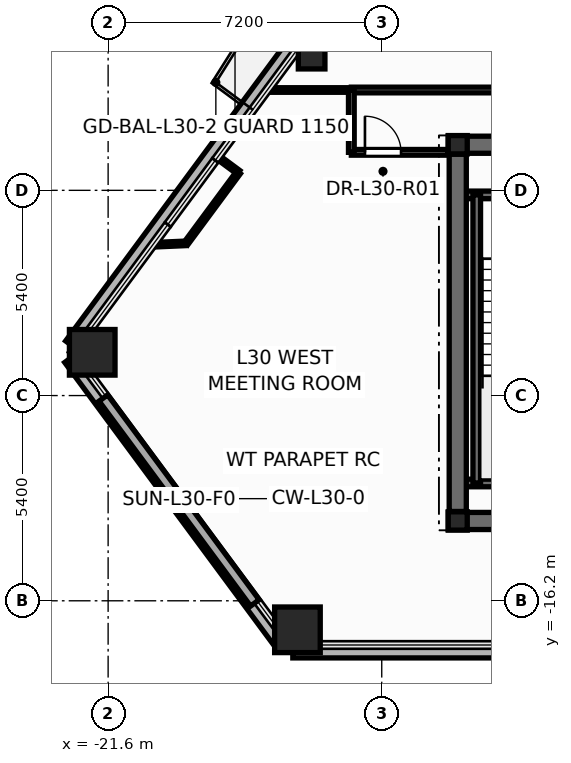
"""IFC4 building model, lengths in metres.
Left out: names, types, materials, properties, quantities, classifications, styles, units other than length and angle.
Written with IfcOpenShell. Run it as: python <this file> out.ifc"""

import sys

from ifc_helpers import new_model, si_unit, direction, frame, frame_2d, origin, origin_2d, place, context, subcontext, project, spatial, rectangle, hollow_rectangle, hollow_circle, i_section, extrude, element, fill, save


model = new_model("IFC4")
c1 = context("Model", 3, precision=1e-05, world=origin(), true_north=direction((0.0, 1.0)))
c2 = subcontext(c1, "Body", "Model", "MODEL_VIEW")
j1 = project(units=[si_unit("LENGTHUNIT", "METRE"), si_unit("PLANEANGLEUNIT", "RADIAN")], contexts=[c1])
p1 = place(None, origin())
s1 = spatial("IfcSite", under=j1, at=p1, CompositionType="ELEMENT")
p2 = place(p1, origin())
s2 = spatial("IfcBuilding", under=s1, at=p2, CompositionType="ELEMENT")
p3 = place(p2, frame((0.0, 0.0, 117.6)))
s3 = spatial("IfcBuildingStorey", under=s2, at=p3, CompositionType="ELEMENT", Elevation=117.6)
for number, where, z_axis, x_axis in (
    (1, (-22.019, -9.662, 0.0), (0.0, 0.0, 1.0), (1.0, 0.0, 0.0)),
    (2, (-16.618, -16.963, 0.0), (0.0, 0.0, 1.0), (1.0, 0.0, 0.0)),
):
    element("IfcColumn", number, at=place(p3, frame(where, z_axis=z_axis, x_axis=x_axis)), inside=s3, PredefinedType="COLUMN", context=c2, shape_type="SweptSolid", body=[
        extrude(hollow_rectangle(XDim=1.2, YDim=1.2, WallThickness=0.055, at=origin_2d()), origin(), (0.0, 0.0, 1.0), 4.5),
    ])
p4 = place(p3, frame((-16.245, -1.856, 0.0), z_axis=(0.0, 0.0, 1.0), x_axis=(1.0, 0.0, 0.0)))
e3 = element("IfcColumn", 3, at=p4, inside=s3, PredefinedType="COLUMN", context=c2, shape_type="SweptSolid", body=[
    extrude(hollow_circle(Radius=0.35, WallThickness=0.03, at=origin_2d()), origin(), (0.0, 0.0, 1.0), 4.5),
])
for number, where, z_axis, x_axis in (
    (4, (-12.4, -14.1, 0.0), (0.0, 0.0, 1.0), (1.0, 0.0, 0.0)),
    (5, (-12.4, -4.2, 0.0), (0.0, 0.0, 1.0), (1.0, 0.0, 0.0)),
):
    element("IfcColumn", number, at=place(p3, frame(where, z_axis=z_axis, x_axis=x_axis)), inside=s3, PredefinedType="COLUMN", context=c2, shape_type="SweptSolid", body=[
        extrude(i_section(OverallWidth=0.5, OverallDepth=0.482, WebThickness=0.04, FlangeThickness=0.045, at=origin_2d()), origin(), (0.0, 0.0, 1.0), 4.5),
    ])
p5 = place(p3, frame((-22.597, -9.821, -0.2), z_axis=(0.0, 0.0, 1.0), x_axis=(0.594653396723, -0.80398217503, 0.0)))
e6 = element("IfcWall", 6, at=p5, inside=s3, PredefinedType="PARAPET", context=c2, shape_type="SweptSolid", body=[
    extrude(rectangle(XDim=9.419, YDim=0.36, at=frame_2d((4.709, 0.0))), origin(), (0.0, 0.0, 1.0), 0.38),
])
p6 = place(p3, frame((-16.74, -17.523, -0.2), z_axis=(0.0, 0.0, 1.0), x_axis=(1.0, 0.0, 0.0)))
e7 = element("IfcWall", 7, at=p6, inside=s3, PredefinedType="PARAPET", context=c2, shape_type="SweptSolid", body=[
    extrude(rectangle(XDim=33.48, YDim=0.36, at=frame_2d((16.74, 0.0))), origin(), (0.0, 0.0, 1.0), 0.38),
])
p7 = place(p3, frame((-14.206, 1.843, -0.2), z_axis=(0.0, 0.0, 1.0), x_axis=(-0.594634463254, -0.803996178542, 0.0)))
e8 = element("IfcWall", 8, at=p7, inside=s3, PredefinedType="PARAPET", context=c2, shape_type="SweptSolid", body=[
    extrude(rectangle(XDim=14.072, YDim=0.36, at=frame_2d((7.036, 0.0))), origin(), (0.0, 0.0, 1.0), 0.38),
])
p8 = place(p3, frame((-12.65, -14.1, 0.0), z_axis=(0.0, 0.0, 1.0), x_axis=(1.0, 0.0, 0.0)))
e9 = element("IfcWall", 9, at=p8, inside=s3, PredefinedType="SHEAR", context=c2, shape_type="SweptSolid", body=[
    extrude(rectangle(XDim=25.3, YDim=0.45, at=frame_2d((12.65, 0.0))), origin(), (0.0, 0.0, 1.0), 4.5),
])
p9 = place(p3, frame((-12.65, -4.2, 0.0), z_axis=(0.0, 0.0, 1.0), x_axis=(1.0, 0.0, 0.0)))
e10 = element("IfcWall", 10, at=p9, inside=s3, PredefinedType="SHEAR", context=c2, shape_type="SweptSolid", body=[
    extrude(rectangle(XDim=25.3, YDim=0.45, at=frame_2d((12.65, 0.0))), origin(), (0.0, 0.0, 1.0), 4.5),
])
p10 = place(p9, frame((1.85, 0.0, 0.0)))
e11 = element("IfcOpeningElement", 11, at=p10, cuts=e10, PredefinedType="OPENING", context=c2, shape_type="SweptSolid", body=[
    extrude(rectangle(XDim=0.756, YDim=2.054, at=frame_2d((0.375, 1.027))), frame((0.0, 0.235, 0.0), z_axis=(0.0, -1.0, 0.0), x_axis=(1.0, 0.0, 0.0)), (0.0, 0.0, 1.0), 0.47),
])
p11 = place(p9, frame((22.65, 0.0, 0.0)))
e12 = element("IfcOpeningElement", 12, at=p11, cuts=e10, PredefinedType="OPENING", context=c2, shape_type="SweptSolid", body=[
    extrude(rectangle(XDim=0.756, YDim=2.054, at=frame_2d((0.375, 1.027))), frame((0.0, 0.235, 0.0), z_axis=(0.0, -1.0, 0.0), x_axis=(1.0, 0.0, 0.0)), (0.0, 0.0, 1.0), 0.47),
])
p12 = place(p9, frame((5.85, 0.0, 0.0)))
e13 = element("IfcOpeningElement", 13, at=p12, cuts=e10, PredefinedType="OPENING", context=c2, shape_type="SweptSolid", body=[
    extrude(rectangle(XDim=1.006, YDim=2.104, at=frame_2d((0.5, 1.052))), frame((0.0, 0.235, 0.0), z_axis=(0.0, -1.0, 0.0), x_axis=(1.0, 0.0, 0.0)), (0.0, 0.0, 1.0), 0.47),
])
p13 = place(p9, frame((10.35, 0.0, 0.0)))
e14 = element("IfcOpeningElement", 14, at=p13, cuts=e10, PredefinedType="OPENING", context=c2, shape_type="SweptSolid", body=[
    extrude(rectangle(XDim=1.406, YDim=2.154, at=frame_2d((0.7, 1.077))), frame((0.0, 0.235, 0.0), z_axis=(0.0, -1.0, 0.0), x_axis=(1.0, 0.0, 0.0)), (0.0, 0.0, 1.0), 0.47),
])
p14 = place(p9, frame((18.45, 0.0, 0.0)))
e15 = element("IfcOpeningElement", 15, at=p14, cuts=e10, PredefinedType="OPENING", context=c2, shape_type="SweptSolid", body=[
    extrude(rectangle(XDim=1.006, YDim=2.104, at=frame_2d((0.5, 1.052))), frame((0.0, 0.235, 0.0), z_axis=(0.0, -1.0, 0.0), x_axis=(1.0, 0.0, 0.0)), (0.0, 0.0, 1.0), 0.47),
])
for number, where, z_axis, x_axis in (
    (16, (-12.35, -5.52, 0.0), (0.0, 0.0, 1.0), (1.0, 0.0, 0.0)),
    (17, (-12.35, -13.1, 0.0), (0.0, 0.0, 1.0), (1.0, 0.0, 0.0)),
):
    element("IfcWall", number, at=place(p3, frame(where, z_axis=z_axis, x_axis=x_axis)), inside=s3, PredefinedType="SOLIDWALL", context=c2, shape_type="SweptSolid", body=[
        extrude(rectangle(XDim=3.87, YDim=0.2, at=frame_2d((1.935, 0.0))), origin(), (0.0, 0.0, 1.0), 4.5),
    ])
p15 = place(p3, frame((-11.9, -13.1, 0.0), z_axis=(0.0, 0.0, 1.0), x_axis=(0.0, 1.0, 0.0)))
e18 = element("IfcWall", 18, at=p15, inside=s3, PredefinedType="SOLIDWALL", context=c2, shape_type="SweptSolid", body=[
    extrude(rectangle(XDim=7.58, YDim=0.2, at=frame_2d((3.79, 0.0))), origin(), (0.0, 0.0, 1.0), 4.5),
])
p16 = place(p3, frame((-12.4, -13.85, 0.0), z_axis=(0.0, 0.0, 1.0), x_axis=(0.0, 1.0, 0.0)))
e19 = element("IfcWall", 19, at=p16, inside=s3, PredefinedType="SHEAR", context=c2, shape_type="SweptSolid", body=[
    extrude(rectangle(XDim=9.4, YDim=0.45, at=frame_2d((4.7, 0.0))), origin(), (0.0, 0.0, 1.0), 4.5),
])
p17 = place(p3, frame((-15.2, -2.76, 0.0), z_axis=(0.0, 0.0, 1.0), x_axis=(1.0, 0.0, 0.0)))
e20 = element("IfcWall", 20, at=p17, inside=s3, PredefinedType="PARTITIONING", context=c2, shape_type="SweptSolid", body=[
    extrude(rectangle(XDim=12.86, YDim=0.15, at=frame_2d((6.43, 0.0))), origin(), (0.0, 0.0, 1.0), 3.225),
])
p18 = place(p17, frame((4.436, 0.0, 0.0)))
e21 = element("IfcOpeningElement", 21, at=p18, cuts=e20, PredefinedType="OPENING", context=c2, shape_type="SweptSolid", body=[
    extrude(rectangle(XDim=0.956, YDim=2.104, at=frame_2d((0.475, 1.052))), frame((0.0, 0.085, 0.0), z_axis=(0.0, -1.0, 0.0), x_axis=(1.0, 0.0, 0.0)), (0.0, 0.0, 1.0), 0.17),
])
p19 = place(p3, frame((-15.2, -4.4, 0.0), z_axis=(0.0, 0.0, 1.0), x_axis=(1.0, 0.0, 0.0)))
e22 = element("IfcWall", 22, at=p19, inside=s3, PredefinedType="PARTITIONING", context=c2, shape_type="SweptSolid", body=[
    extrude(rectangle(XDim=2.548, YDim=0.15, at=frame_2d((1.274, 0.0))), origin(), (0.0, 0.0, 1.0), 3.225),
])
p20 = place(p19, frame((0.358, 0.0, 0.0)))
e23 = element("IfcOpeningElement", 23, at=p20, cuts=e22, PredefinedType="OPENING", context=c2, shape_type="SweptSolid", body=[
    extrude(rectangle(XDim=0.956, YDim=2.104, at=frame_2d((0.475, 1.052))), frame((0.0, 0.085, 0.0), z_axis=(0.0, -1.0, 0.0), x_axis=(1.0, 0.0, 0.0)), (0.0, 0.0, 1.0), 0.17),
])
p21 = place(p3, frame((-18.168, -4.927, 0.0), z_axis=(0.0, 0.0, 1.0), x_axis=(-0.594589014846, -0.804029790135, 0.0)))
e24 = element("IfcWall", 24, at=p21, inside=s3, PredefinedType="PARTITIONING", context=c2, shape_type="SweptSolid", body=[
    extrude(rectangle(XDim=2.323, YDim=0.12, at=frame_2d((1.162, 0.0))), origin(), (0.0, 0.0, 1.0), 4.25),
])
p22 = place(p3, frame((-17.411, -2.76, 0.0), z_axis=(0.0, 0.0, 1.0), x_axis=(1.0, 0.0, 0.0)))
e25 = element("IfcWall", 25, at=p22, inside=s3, PredefinedType="PARTITIONING", context=c2, shape_type="SweptSolid", body=[
    extrude(rectangle(XDim=2.211, YDim=0.12, at=frame_2d((1.106, 0.0))), origin(), (0.0, 0.0, 1.0), 3.692),
])
p23 = place(p3, frame((-15.2, -4.4, 0.0), z_axis=(0.0, 0.0, 1.0), x_axis=(0.0, 1.0, 0.0)))
e26 = element("IfcWall", 26, at=p23, inside=s3, PredefinedType="PARTITIONING", context=c2, shape_type="SweptSolid", body=[
    extrude(rectangle(XDim=1.64, YDim=0.15, at=frame_2d((0.82, 0.0))), origin(), (0.0, 0.0, 1.0), 4.25),
])
p24 = place(p3, frame((-19.55, -6.795, 0.0), z_axis=(0.0, 0.0, 1.0), x_axis=(-0.999048124627, -0.043621607937, 0.0)))
e27 = element("IfcWall", 27, at=p24, inside=s3, PredefinedType="PARTITIONING", context=c2, shape_type="SweptSolid", body=[
    extrude(rectangle(XDim=0.862, YDim=0.12, at=frame_2d((0.431, 0.0))), origin(), (0.0, 0.0, 1.0), 3.692),
])
p25 = place(p3, frame((-18.707, -4.529, 0.0), z_axis=(0.0, 0.0, 1.0), x_axis=(0.804092805945, -0.59450379261, 0.0)))
e28 = element("IfcWall", 28, at=p25, inside=s3, PredefinedType="PARTITIONING", context=c2, shape_type="SweptSolid", body=[
    extrude(rectangle(XDim=0.67, YDim=0.12, at=frame_2d((0.335, 0.0))), origin(), (0.0, 0.0, 1.0), 3.692),
])
p26 = place(p20, origin())
e29 = element("IfcDoor", 29, at=p26, inside=s3, OperationType="SINGLE_SWING_LEFT", PredefinedType="DOOR", context=c2, shape_type="SweptSolid", body=[
    extrude(rectangle(XDim=0.95, YDim=2.1, at=frame_2d((0.475, 1.05))), frame((0.0, 0.025, 0.0), z_axis=(0.0, -1.0, 0.0), x_axis=(1.0, 0.0, 0.0)), (0.0, 0.0, 1.0), 0.05),
])
fill(e23, e29)
save(model, sys.argv[1])
